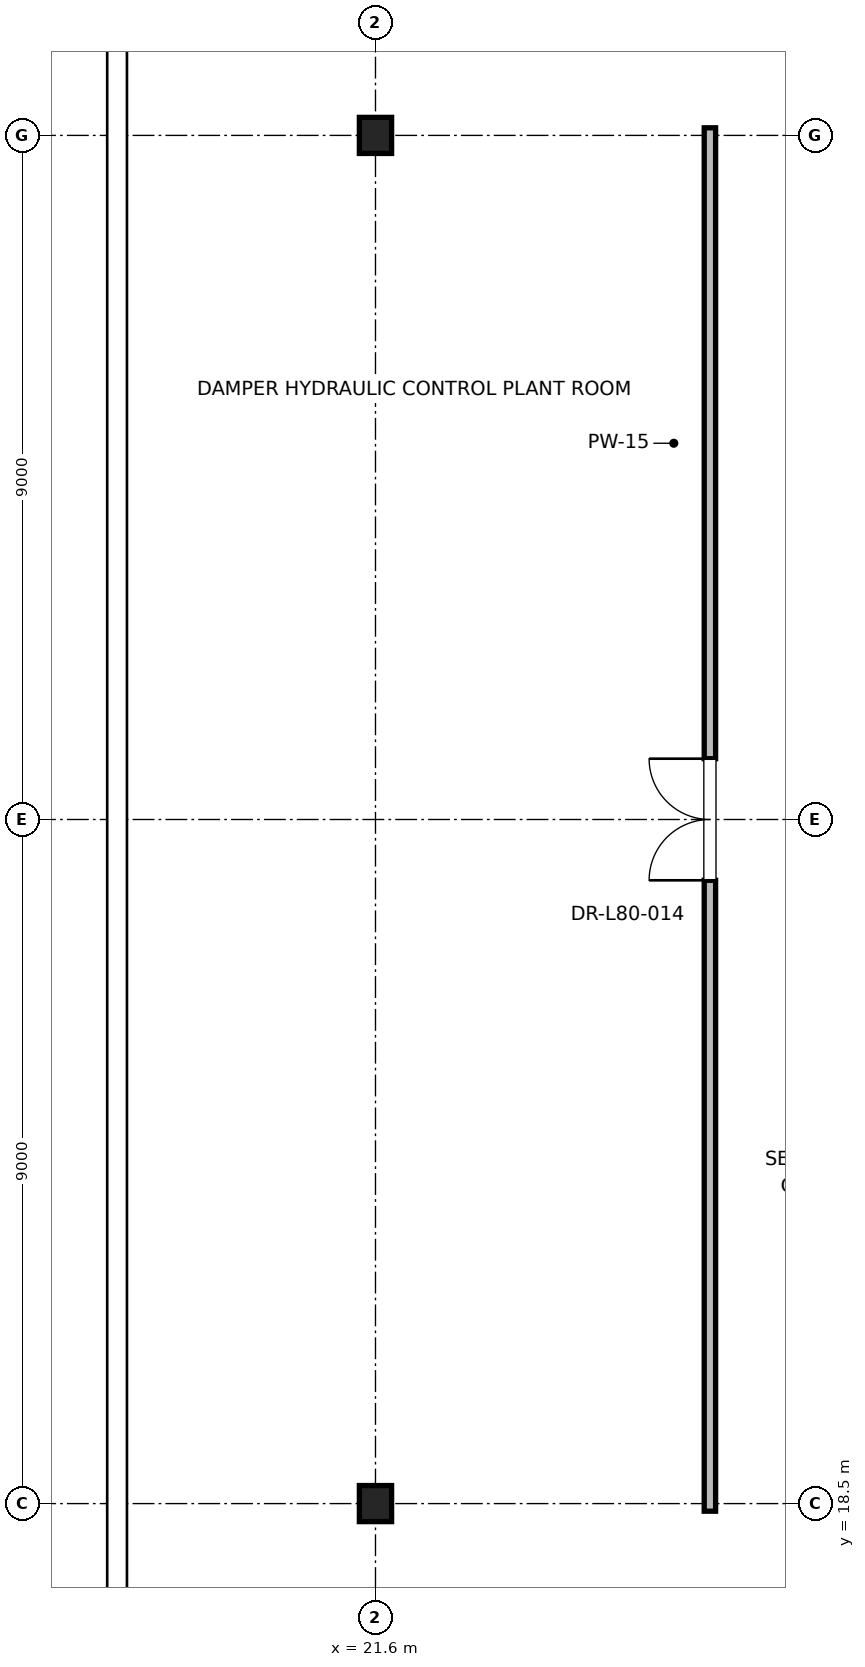
"""IFC4 building model, lengths in metres.
Left out: names, types, materials, properties, quantities, classifications, styles, units other than length and angle.
Written with IfcOpenShell. Run it as: python <this file> out.ifc"""

import sys

from ifc_helpers import new_model, si_unit, direction, frame, frame_2d, origin, origin_2d, place, context, subcontext, project, spatial, rectangle, i_section, extrude, element, fill, save


model = new_model("IFC4")
c1 = context("Model", 3, precision=1e-05, world=origin(), true_north=direction((0.0, 1.0)))
c2 = subcontext(c1, "Body", "Model", "MODEL_VIEW")
j1 = project(units=[si_unit("LENGTHUNIT", "METRE"), si_unit("PLANEANGLEUNIT", "RADIAN")], contexts=[c1])
p1 = place(None, origin())
s1 = spatial("IfcSite", under=j1, at=p1, CompositionType="ELEMENT")
p2 = place(p1, origin())
s2 = spatial("IfcBuilding", under=s1, at=p2, CompositionType="ELEMENT")
p3 = place(p2, frame((0.0, 0.0, 342.8)))
s3 = spatial("IfcBuildingStorey", under=s2, at=p3, CompositionType="ELEMENT", Elevation=342.8)
for number, where, z_axis, x_axis in (
    (1, (21.6, 18.5, 0.0), (0.0, 0.0, 1.0), (1.0, 0.0, 0.0)),
    (2, (21.6, 36.5, 0.0), (0.0, 0.0, 1.0), (1.0, 0.0, 0.0)),
):
    element("IfcColumn", number, at=place(p3, frame(where, z_axis=z_axis, x_axis=x_axis)), inside=s3, PredefinedType="COLUMN", context=c2, shape_type="SweptSolid", body=[
        extrude(i_section(OverallWidth=0.424, OverallDepth=0.475, WebThickness=0.048, FlangeThickness=0.077, FilletRadius=0.015, at=origin_2d()), origin(), (0.0, 0.0, 1.0), 6.0),
    ])
p4 = place(p3, frame((26.0, 18.4, 0.0), z_axis=(0.0, 0.0, 1.0), x_axis=(0.0, 1.0, 0.0)))
e3 = element("IfcWall", 3, at=p4, inside=s3, PredefinedType="PARTITIONING", context=c2, shape_type="SweptSolid", body=[
    extrude(rectangle(XDim=18.2, YDim=0.15, at=frame_2d((9.1, 0.0))), origin(), (0.0, 0.0, 1.0), 2.85),
])
p5 = place(p4, frame((8.3, 0.0, 0.0)))
e4 = element("IfcOpeningElement", 4, at=p5, cuts=e3, PredefinedType="OPENING", context=c2, shape_type="SweptSolid", body=[
    extrude(rectangle(XDim=1.6, YDim=2.25, at=frame_2d((0.8, 1.125))), frame((0.0, 0.075, 0.0), z_axis=(0.0, -1.0, 0.0), x_axis=(1.0, 0.0, 0.0)), (0.0, 0.0, 1.0), 0.15),
])
p6 = place(p5, origin())
e5 = element("IfcDoor", 5, at=p6, inside=s3, OperationType="DOUBLE_DOOR_SINGLE_SWING", PredefinedType="DOOR", context=c2, shape_type="SweptSolid", body=[
    extrude(rectangle(XDim=1.6, YDim=2.25, at=frame_2d((0.8, 1.125))), frame((0.0, 0.025, 0.0), z_axis=(0.0, -1.0, 0.0), x_axis=(1.0, 0.0, 0.0)), (0.0, 0.0, 1.0), 0.05),
])
fill(e4, e5)
save(model, sys.argv[1])
